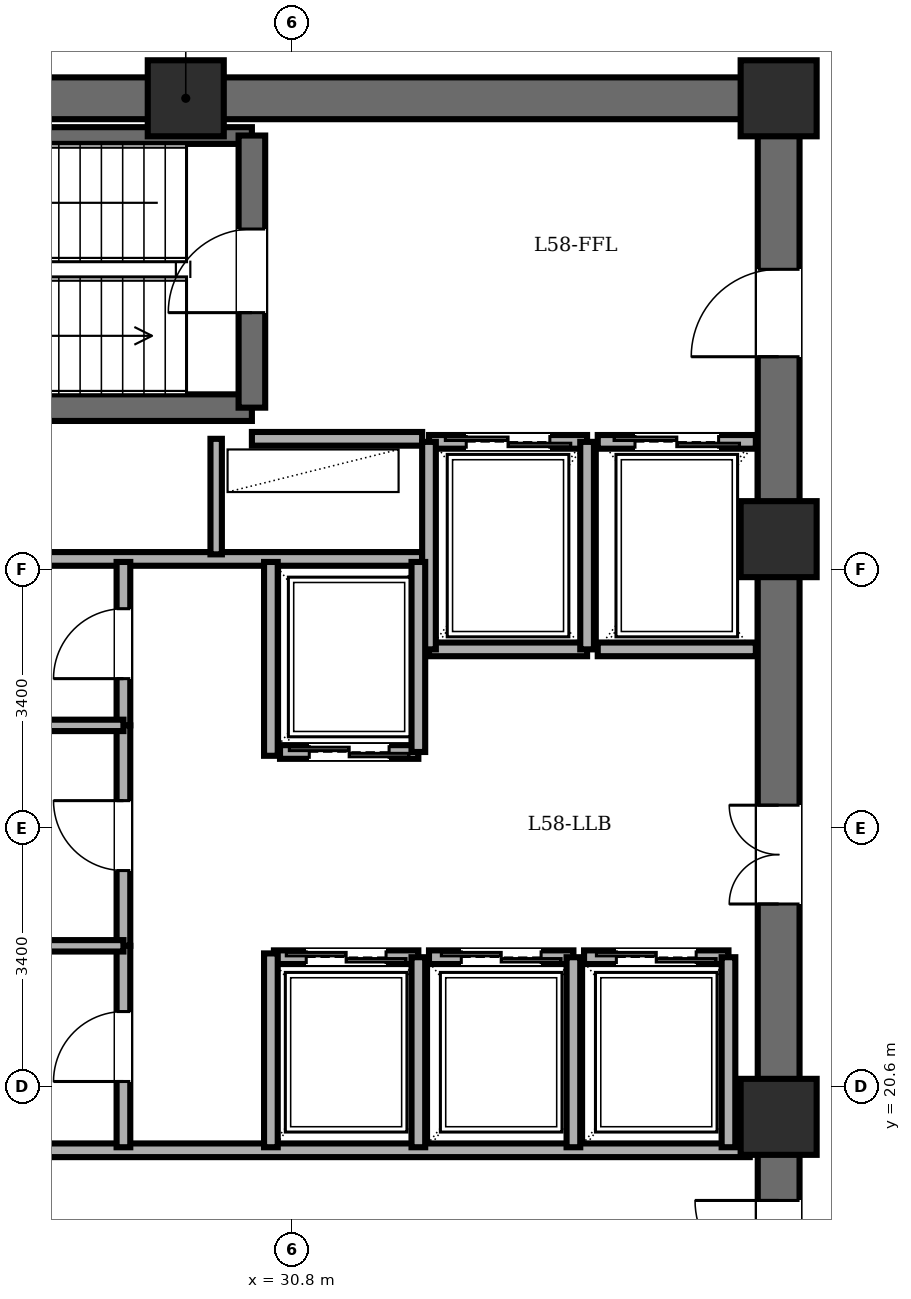
"""IFC4 building model, lengths in metres.
Left out: names, types, materials, properties, quantities, classifications, styles, units other than length and angle.
Written with IfcOpenShell. Run it as: python <this file> out.ifc"""

import sys

from ifc_helpers import new_model, si_unit, direction, frame, frame_2d, origin, origin_2d, place, context, subcontext, project, spatial, rectangle, extrude, element, fill, save


model = new_model("IFC4")
c1 = context("Model", 3, precision=1e-05, world=origin(), true_north=direction((0.0, 1.0)))
c2 = subcontext(c1, "Body", "Model", "MODEL_VIEW")
j1 = project(units=[si_unit("LENGTHUNIT", "METRE"), si_unit("PLANEANGLEUNIT", "RADIAN")], contexts=[c1])
p1 = place(None, origin())
s1 = spatial("IfcSite", under=j1, at=p1, CompositionType="ELEMENT")
p2 = place(p1, origin())
s2 = spatial("IfcBuilding", under=s1, at=p2, CompositionType="ELEMENT")
p3 = place(p2, frame((0.0, 0.0, 222.9)))
s3 = spatial("IfcBuildingStorey", under=s2, at=p3, CompositionType="ELEMENT", Elevation=222.9)
for number, where, z_axis, x_axis in (
    (1, (37.2, 20.2, 0.0), (0.0, 0.0, 1.0), (1.0, 0.0, 0.0)),
    (2, (37.2, 27.8, 0.0), (0.0, 0.0, 1.0), (1.0, 0.0, 0.0)),
    (3, (37.2, 33.6, 0.0), (0.0, 0.0, 1.0), (1.0, 0.0, 0.0)),
    (4, (29.4, 33.6, 0.0), (0.0, 0.0, 1.0), (1.0, 0.0, 0.0)),
):
    element("IfcColumn", number, at=place(p3, frame(where, z_axis=z_axis, x_axis=x_axis)), inside=s3, PredefinedType="COLUMN", context=c2, shape_type="SweptSolid", body=[
        extrude(rectangle(XDim=1.0, YDim=1.0, at=origin_2d()), origin(), (0.0, 0.0, 1.0), 3.6),
    ])
p4 = place(p3, frame((21.6, 33.6, 0.0), z_axis=(0.0, 0.0, 1.0), x_axis=(1.0, 0.0, 0.0)))
e5 = element("IfcWall", 5, at=p4, inside=s3, PredefinedType="SHEAR", context=c2, shape_type="SweptSolid", body=[
    extrude(rectangle(XDim=15.6, YDim=0.55, at=frame_2d((7.8, 0.0))), origin(), (0.0, 0.0, 1.0), 3.4),
])
p5 = place(p3, frame((37.2, 14.4, 0.0), z_axis=(0.0, 0.0, 1.0), x_axis=(0.0, 1.0, 0.0)))
e6 = element("IfcWall", 6, at=p5, inside=s3, PredefinedType="SHEAR", context=c2, shape_type="SweptSolid", body=[
    extrude(rectangle(XDim=19.2, YDim=0.55, at=frame_2d((9.6, 0.0))), origin(), (0.0, 0.0, 1.0), 3.4),
])
p6 = place(p5, frame((15.8, 0.0, 0.0)))
e7 = element("IfcOpeningElement", 7, at=p6, cuts=e6, PredefinedType="OPENING", context=c2, shape_type="SweptSolid", body=[
    extrude(rectangle(XDim=1.15, YDim=2.15, at=frame_2d((0.575, 1.075))), frame((0.0, 0.285, 0.0), z_axis=(0.0, -1.0, 0.0), x_axis=(1.0, 0.0, 0.0)), (0.0, 0.0, 1.0), 0.57),
])
p7 = place(p5, frame((3.6, 0.0, 0.0)))
e8 = element("IfcOpeningElement", 8, at=p7, cuts=e6, PredefinedType="OPENING", context=c2, shape_type="SweptSolid", body=[
    extrude(rectangle(XDim=1.1, YDim=2.15, at=frame_2d((0.55, 1.075))), frame((0.0, 0.285, 0.0), z_axis=(0.0, -1.0, 0.0), x_axis=(1.0, 0.0, 0.0)), (0.0, 0.0, 1.0), 0.57),
])
p8 = place(p5, frame((8.6, 0.0, 0.0)))
e9 = element("IfcOpeningElement", 9, at=p8, cuts=e6, PredefinedType="OPENING", context=c2, shape_type="SweptSolid", body=[
    extrude(rectangle(XDim=1.3, YDim=2.2, at=frame_2d((0.65, 1.1))), frame((0.0, 0.285, 0.0), z_axis=(0.0, -1.0, 0.0), x_axis=(1.0, 0.0, 0.0)), (0.0, 0.0, 1.0), 0.57),
])
p9 = place(p3, frame((22.48, 29.53, 0.0), z_axis=(0.0, 0.0, 1.0), x_axis=(1.0, 0.0, 0.0)))
e10 = element("IfcWall", 10, at=p9, inside=s3, PredefinedType="SOLIDWALL", context=c2, shape_type="SweptSolid", body=[
    extrude(rectangle(XDim=7.79, YDim=0.35, at=frame_2d((3.895, 0.0))), origin(), (0.0, 0.0, 1.0), 3.4),
])
p10 = place(p3, frame((22.48, 33.11, 0.0), z_axis=(0.0, 0.0, 1.0), x_axis=(1.0, 0.0, 0.0)))
e11 = element("IfcWall", 11, at=p10, inside=s3, PredefinedType="PARTITIONING", context=c2, shape_type="SweptSolid", body=[
    extrude(rectangle(XDim=7.79, YDim=0.22, at=frame_2d((3.895, 0.0))), origin(), (0.0, 0.0, 1.0), 3.4),
])
p11 = place(p3, frame((30.27, 29.53, 0.0), z_axis=(0.0, 0.0, 1.0), x_axis=(0.0, 1.0, 0.0)))
e12 = element("IfcWall", 12, at=p11, inside=s3, PredefinedType="SOLIDWALL", context=c2, shape_type="SweptSolid", body=[
    extrude(rectangle(XDim=3.58, YDim=0.35, at=frame_2d((1.79, 0.0))), origin(), (0.0, 0.0, 1.0), 3.4),
])
p12 = place(p11, frame((1.25, 0.0, 0.0)))
e13 = element("IfcOpeningElement", 13, at=p12, cuts=e12, PredefinedType="OPENING", context=c2, shape_type="SweptSolid", body=[
    extrude(rectangle(XDim=1.1, YDim=2.15, at=frame_2d((0.55, 1.075))), frame((0.0, 0.185, 0.0), z_axis=(0.0, -1.0, 0.0), x_axis=(1.0, 0.0, 0.0)), (0.0, 0.0, 1.0), 0.37),
])
p13 = place(p3, frame((30.27, 29.12, 0.0), z_axis=(0.0, 0.0, 1.0), x_axis=(1.0, 0.0, 0.0)))
e14 = element("IfcWall", 14, at=p13, inside=s3, PredefinedType="PARTITIONING", context=c2, shape_type="SweptSolid", body=[
    extrude(rectangle(XDim=2.24, YDim=0.18, at=frame_2d((1.12, 0.0))), origin(), (0.0, 0.0, 1.0), 3.4),
])
p14 = place(p3, frame((21.95, 27.54, 0.0), z_axis=(0.0, 0.0, 1.0), x_axis=(1.0, 0.0, 0.0)))
e15 = element("IfcWall", 15, at=p14, inside=s3, PredefinedType="PARTITIONING", context=c2, shape_type="SweptSolid", body=[
    extrude(rectangle(XDim=10.56, YDim=0.18, at=frame_2d((5.28, 0.0))), origin(), (0.0, 0.0, 1.0), 3.4),
])
p15 = place(p3, frame((29.8, 27.6, 0.0), z_axis=(0.0, 0.0, 1.0), x_axis=(0.0, 1.0, 0.0)))
e16 = element("IfcWall", 16, at=p15, inside=s3, PredefinedType="PARTITIONING", context=c2, shape_type="SweptSolid", body=[
    extrude(rectangle(XDim=1.52, YDim=0.15, at=frame_2d((0.76, 0.0))), origin(), (0.0, 0.0, 1.0), 3.4),
])
p16 = place(p3, frame((21.95, 19.76, 0.0), z_axis=(0.0, 0.0, 1.0), x_axis=(1.0, 0.0, 0.0)))
e17 = element("IfcWall", 17, at=p16, inside=s3, PredefinedType="PARTITIONING", context=c2, shape_type="SweptSolid", body=[
    extrude(rectangle(XDim=14.87, YDim=0.18, at=frame_2d((7.435, 0.0))), origin(), (0.0, 0.0, 1.0), 3.4),
])
p17 = place(p3, frame((32.6, 29.08, 0.0), z_axis=(0.0, 0.0, 1.0), x_axis=(1.0, 0.0, 0.0)))
e18 = element("IfcWall", 18, at=p17, inside=s3, PredefinedType="PARTITIONING", context=c2, shape_type="SweptSolid", body=[
    extrude(rectangle(XDim=2.08, YDim=0.18, at=frame_2d((1.04, 0.0))), origin(), (0.0, 0.0, 1.0), 3.4),
])
p18 = place(p17, frame((0.49, 0.0, 0.0)))
e19 = element("IfcOpeningElement", 19, at=p18, cuts=e18, PredefinedType="OPENING", context=c2, shape_type="SweptSolid", body=[
    extrude(rectangle(XDim=1.1, YDim=2.2, at=frame_2d((0.55, 1.1))), frame((0.0, 0.1, 0.0), z_axis=(0.0, -1.0, 0.0), x_axis=(1.0, 0.0, 0.0)), (0.0, 0.0, 1.0), 0.2),
])
p19 = place(p3, frame((34.68, 26.35, 0.0), z_axis=(0.0, 0.0, 1.0), x_axis=(-1.0, 0.0, 0.0)))
e20 = element("IfcWall", 20, at=p19, inside=s3, PredefinedType="PARTITIONING", context=c2, shape_type="SweptSolid", body=[
    extrude(rectangle(XDim=2.08, YDim=0.18, at=frame_2d((1.04, 0.0))), origin(), (0.0, 0.0, 1.0), 3.4),
])
for number, where, z_axis, x_axis in (
    (21, (34.68, 26.35, 0.0), (0.0, 0.0, 1.0), (0.0, 1.0, 0.0)),
    (22, (32.6, 29.08, 0.0), (0.0, 0.0, 1.0), (0.0, -1.0, 0.0)),
):
    element("IfcWall", number, at=place(p3, frame(where, z_axis=z_axis, x_axis=x_axis)), inside=s3, PredefinedType="PARTITIONING", context=c2, shape_type="SweptSolid", body=[
        extrude(rectangle(XDim=2.73, YDim=0.18, at=frame_2d((1.365, 0.0))), origin(), (0.0, 0.0, 1.0), 3.4),
    ])
p20 = place(p3, frame((34.82, 29.08, 0.0), z_axis=(0.0, 0.0, 1.0), x_axis=(1.0, 0.0, 0.0)))
e23 = element("IfcWall", 23, at=p20, inside=s3, PredefinedType="PARTITIONING", context=c2, shape_type="SweptSolid", body=[
    extrude(rectangle(XDim=2.08, YDim=0.18, at=frame_2d((1.04, 0.0))), origin(), (0.0, 0.0, 1.0), 3.4),
])
p21 = place(p20, frame((0.49, 0.0, 0.0)))
e24 = element("IfcOpeningElement", 24, at=p21, cuts=e23, PredefinedType="OPENING", context=c2, shape_type="SweptSolid", body=[
    extrude(rectangle(XDim=1.1, YDim=2.2, at=frame_2d((0.55, 1.1))), frame((0.0, 0.1, 0.0), z_axis=(0.0, -1.0, 0.0), x_axis=(1.0, 0.0, 0.0)), (0.0, 0.0, 1.0), 0.2),
])
p22 = place(p3, frame((36.9, 26.35, 0.0), z_axis=(0.0, 0.0, 1.0), x_axis=(-1.0, 0.0, 0.0)))
e25 = element("IfcWall", 25, at=p22, inside=s3, PredefinedType="PARTITIONING", context=c2, shape_type="SweptSolid", body=[
    extrude(rectangle(XDim=2.08, YDim=0.18, at=frame_2d((1.04, 0.0))), origin(), (0.0, 0.0, 1.0), 3.4),
])
p23 = place(p3, frame((32.46, 25.0, 0.0), z_axis=(0.0, 0.0, 1.0), x_axis=(-1.0, 0.0, 0.0)))
e26 = element("IfcWall", 26, at=p23, inside=s3, PredefinedType="PARTITIONING", context=c2, shape_type="SweptSolid", body=[
    extrude(rectangle(XDim=1.82, YDim=0.18, at=frame_2d((0.91, 0.0))), origin(), (0.0, 0.0, 1.0), 3.4),
])
p24 = place(p23, frame((0.385, 0.0, 0.0)))
e27 = element("IfcOpeningElement", 27, at=p24, cuts=e26, PredefinedType="OPENING", context=c2, shape_type="SweptSolid", body=[
    extrude(rectangle(XDim=1.05, YDim=2.2, at=frame_2d((0.525, 1.1))), frame((0.0, 0.1, 0.0), z_axis=(0.0, -1.0, 0.0), x_axis=(1.0, 0.0, 0.0)), (0.0, 0.0, 1.0), 0.2),
])
p25 = place(p3, frame((32.46, 25.0, 0.0), z_axis=(0.0, 0.0, 1.0), x_axis=(0.0, 1.0, 0.0)))
e28 = element("IfcWall", 28, at=p25, inside=s3, PredefinedType="PARTITIONING", context=c2, shape_type="SweptSolid", body=[
    extrude(rectangle(XDim=2.5, YDim=0.18, at=frame_2d((1.25, 0.0))), origin(), (0.0, 0.0, 1.0), 3.4),
])
p26 = place(p3, frame((30.56, 22.3, 0.0), z_axis=(0.0, 0.0, 1.0), x_axis=(1.0, 0.0, 0.0)))
e29 = element("IfcWall", 29, at=p26, inside=s3, PredefinedType="PARTITIONING", context=c2, shape_type="SweptSolid", body=[
    extrude(rectangle(XDim=1.9, YDim=0.18, at=frame_2d((0.95, 0.0))), origin(), (0.0, 0.0, 1.0), 3.4),
])
p27 = place(p26, frame((0.425, 0.0, 0.0)))
e30 = element("IfcOpeningElement", 30, at=p27, cuts=e29, PredefinedType="OPENING", context=c2, shape_type="SweptSolid", body=[
    extrude(rectangle(XDim=1.05, YDim=2.2, at=frame_2d((0.525, 1.1))), frame((0.0, 0.1, 0.0), z_axis=(0.0, -1.0, 0.0), x_axis=(1.0, 0.0, 0.0)), (0.0, 0.0, 1.0), 0.2),
])
p28 = place(p3, frame((32.46, 19.8, 0.0), z_axis=(0.0, 0.0, 1.0), x_axis=(0.0, 1.0, 0.0)))
e31 = element("IfcWall", 31, at=p28, inside=s3, PredefinedType="PARTITIONING", context=c2, shape_type="SweptSolid", body=[
    extrude(rectangle(XDim=2.5, YDim=0.18, at=frame_2d((1.25, 0.0))), origin(), (0.0, 0.0, 1.0), 3.4),
])
p29 = place(p3, frame((32.6, 22.3, 0.0), z_axis=(0.0, 0.0, 1.0), x_axis=(1.0, 0.0, 0.0)))
e32 = element("IfcWall", 32, at=p29, inside=s3, PredefinedType="PARTITIONING", context=c2, shape_type="SweptSolid", body=[
    extrude(rectangle(XDim=1.9, YDim=0.18, at=frame_2d((0.95, 0.0))), origin(), (0.0, 0.0, 1.0), 3.4),
])
p30 = place(p29, frame((0.425, 0.0, 0.0)))
e33 = element("IfcOpeningElement", 33, at=p30, cuts=e32, PredefinedType="OPENING", context=c2, shape_type="SweptSolid", body=[
    extrude(rectangle(XDim=1.05, YDim=2.2, at=frame_2d((0.525, 1.1))), frame((0.0, 0.1, 0.0), z_axis=(0.0, -1.0, 0.0), x_axis=(1.0, 0.0, 0.0)), (0.0, 0.0, 1.0), 0.2),
])
p31 = place(p3, frame((34.5, 19.8, 0.0), z_axis=(0.0, 0.0, 1.0), x_axis=(0.0, 1.0, 0.0)))
e34 = element("IfcWall", 34, at=p31, inside=s3, PredefinedType="PARTITIONING", context=c2, shape_type="SweptSolid", body=[
    extrude(rectangle(XDim=2.5, YDim=0.18, at=frame_2d((1.25, 0.0))), origin(), (0.0, 0.0, 1.0), 3.4),
])
p32 = place(p3, frame((34.64, 22.3, 0.0), z_axis=(0.0, 0.0, 1.0), x_axis=(1.0, 0.0, 0.0)))
e35 = element("IfcWall", 35, at=p32, inside=s3, PredefinedType="PARTITIONING", context=c2, shape_type="SweptSolid", body=[
    extrude(rectangle(XDim=1.9, YDim=0.18, at=frame_2d((0.95, 0.0))), origin(), (0.0, 0.0, 1.0), 3.4),
])
p33 = place(p32, frame((0.425, 0.0, 0.0)))
e36 = element("IfcOpeningElement", 36, at=p33, cuts=e35, PredefinedType="OPENING", context=c2, shape_type="SweptSolid", body=[
    extrude(rectangle(XDim=1.05, YDim=2.2, at=frame_2d((0.525, 1.1))), frame((0.0, 0.1, 0.0), z_axis=(0.0, -1.0, 0.0), x_axis=(1.0, 0.0, 0.0)), (0.0, 0.0, 1.0), 0.2),
])
p34 = place(p3, frame((36.54, 19.8, 0.0), z_axis=(0.0, 0.0, 1.0), x_axis=(0.0, 1.0, 0.0)))
e37 = element("IfcWall", 37, at=p34, inside=s3, PredefinedType="PARTITIONING", context=c2, shape_type="SweptSolid", body=[
    extrude(rectangle(XDim=2.5, YDim=0.18, at=frame_2d((1.25, 0.0))), origin(), (0.0, 0.0, 1.0), 3.4),
])
for number, where, z_axis, x_axis in (
    (38, (30.52, 24.95, 0.0), (0.0, 0.0, 1.0), (0.0, 1.0, 0.0)),
    (39, (30.52, 19.8, 0.0), (0.0, 0.0, 1.0), (0.0, 1.0, 0.0)),
):
    element("IfcWall", number, at=place(p3, frame(where, z_axis=z_axis, x_axis=x_axis)), inside=s3, PredefinedType="PARTITIONING", context=c2, shape_type="SweptSolid", body=[
        extrude(rectangle(XDim=2.55, YDim=0.18, at=frame_2d((1.275, 0.0))), origin(), (0.0, 0.0, 1.0), 3.4),
    ])
p35 = place(p3, frame((28.58, 25.35, 0.0), z_axis=(0.0, 0.0, 1.0), x_axis=(0.0, 1.0, 0.0)))
e40 = element("IfcWall", 40, at=p35, inside=s3, PredefinedType="PARTITIONING", context=c2, shape_type="SweptSolid", body=[
    extrude(rectangle(XDim=2.15, YDim=0.18, at=frame_2d((1.075, 0.0))), origin(), (0.0, 0.0, 1.0), 3.4),
])
p36 = place(p35, frame((0.615, 0.0, 0.0)))
e41 = element("IfcOpeningElement", 41, at=p36, cuts=e40, PredefinedType="OPENING", context=c2, shape_type="SweptSolid", body=[
    extrude(rectangle(XDim=0.92, YDim=2.1, at=frame_2d((0.46, 1.05))), frame((0.0, 0.1, 0.0), z_axis=(0.0, -1.0, 0.0), x_axis=(1.0, 0.0, 0.0)), (0.0, 0.0, 1.0), 0.2),
])
p37 = place(p3, frame((28.58, 22.45, 0.0), z_axis=(0.0, 0.0, 1.0), x_axis=(0.0, 1.0, 0.0)))
e42 = element("IfcWall", 42, at=p37, inside=s3, PredefinedType="PARTITIONING", context=c2, shape_type="SweptSolid", body=[
    extrude(rectangle(XDim=2.9, YDim=0.18, at=frame_2d((1.45, 0.0))), origin(), (0.0, 0.0, 1.0), 3.4),
])
p38 = place(p37, frame((0.99, 0.0, 0.0)))
e43 = element("IfcOpeningElement", 43, at=p38, cuts=e42, PredefinedType="OPENING", context=c2, shape_type="SweptSolid", body=[
    extrude(rectangle(XDim=0.92, YDim=2.1, at=frame_2d((0.46, 1.05))), frame((0.0, 0.1, 0.0), z_axis=(0.0, -1.0, 0.0), x_axis=(1.0, 0.0, 0.0)), (0.0, 0.0, 1.0), 0.2),
])
p39 = place(p3, frame((28.58, 19.8, 0.0), z_axis=(0.0, 0.0, 1.0), x_axis=(0.0, 1.0, 0.0)))
e44 = element("IfcWall", 44, at=p39, inside=s3, PredefinedType="PARTITIONING", context=c2, shape_type="SweptSolid", body=[
    extrude(rectangle(XDim=2.65, YDim=0.18, at=frame_2d((1.325, 0.0))), origin(), (0.0, 0.0, 1.0), 3.4),
])
p40 = place(p39, frame((0.865, 0.0, 0.0)))
e45 = element("IfcOpeningElement", 45, at=p40, cuts=e44, PredefinedType="OPENING", context=c2, shape_type="SweptSolid", body=[
    extrude(rectangle(XDim=0.92, YDim=2.1, at=frame_2d((0.46, 1.05))), frame((0.0, 0.1, 0.0), z_axis=(0.0, -1.0, 0.0), x_axis=(1.0, 0.0, 0.0)), (0.0, 0.0, 1.0), 0.2),
])
for number, where, z_axis, x_axis in (
    (46, (21.95, 25.35, 0.0), (0.0, 0.0, 1.0), (1.0, 0.0, 0.0)),
    (47, (21.95, 22.45, 0.0), (0.0, 0.0, 1.0), (1.0, 0.0, 0.0)),
):
    element("IfcWall", number, at=place(p3, frame(where, z_axis=z_axis, x_axis=x_axis)), inside=s3, PredefinedType="PARTITIONING", context=c2, shape_type="SweptSolid", body=[
        extrude(rectangle(XDim=6.63, YDim=0.15, at=frame_2d((3.315, 0.0))), origin(), (0.0, 0.0, 1.0), 3.4),
    ])
p41 = place(p12, origin())
e48 = element("IfcDoor", 48, at=p41, inside=s3, OperationType="SINGLE_SWING_LEFT", PredefinedType="DOOR", context=c2, shape_type="SweptSolid", body=[
    extrude(rectangle(XDim=1.1, YDim=2.15, at=frame_2d((0.55, 1.075))), frame((0.0, 0.025, 0.0), z_axis=(0.0, -1.0, 0.0), x_axis=(1.0, 0.0, 0.0)), (0.0, 0.0, 1.0), 0.05),
])
fill(e13, e48)
p42 = place(p6, origin())
e49 = element("IfcDoor", 49, at=p42, inside=s3, OperationType="SINGLE_SWING_LEFT", PredefinedType="DOOR", context=c2, shape_type="SweptSolid", body=[
    extrude(rectangle(XDim=1.15, YDim=2.15, at=frame_2d((0.575, 1.075))), frame((0.0, 0.025, 0.0), z_axis=(0.0, -1.0, 0.0), x_axis=(1.0, 0.0, 0.0)), (0.0, 0.0, 1.0), 0.05),
])
fill(e7, e49)
p43 = place(p7, origin())
e50 = element("IfcDoor", 50, at=p43, inside=s3, OperationType="SINGLE_SWING_RIGHT", PredefinedType="DOOR", context=c2, shape_type="SweptSolid", body=[
    extrude(rectangle(XDim=1.1, YDim=2.15, at=frame_2d((0.55, 1.075))), frame((0.0, 0.025, 0.0), z_axis=(0.0, -1.0, 0.0), x_axis=(1.0, 0.0, 0.0)), (0.0, 0.0, 1.0), 0.05),
])
fill(e8, e50)
p44 = place(p18, origin())
e51 = element("IfcDoor", 51, at=p44, inside=s3, OperationType="DOUBLE_DOOR_SLIDING", PredefinedType="DOOR", context=c2, shape_type="SweptSolid", body=[
    extrude(rectangle(XDim=1.1, YDim=2.2, at=frame_2d((0.55, 1.1))), frame((0.0, 0.025, 0.0), z_axis=(0.0, -1.0, 0.0), x_axis=(1.0, 0.0, 0.0)), (0.0, 0.0, 1.0), 0.05),
])
fill(e19, e51)
p45 = place(p21, origin())
e52 = element("IfcDoor", 52, at=p45, inside=s3, OperationType="DOUBLE_DOOR_SLIDING", PredefinedType="DOOR", context=c2, shape_type="SweptSolid", body=[
    extrude(rectangle(XDim=1.1, YDim=2.2, at=frame_2d((0.55, 1.1))), frame((0.0, 0.025, 0.0), z_axis=(0.0, -1.0, 0.0), x_axis=(1.0, 0.0, 0.0)), (0.0, 0.0, 1.0), 0.05),
])
fill(e24, e52)
p46 = place(p24, origin())
e53 = element("IfcDoor", 53, at=p46, inside=s3, OperationType="DOUBLE_DOOR_SLIDING", PredefinedType="DOOR", context=c2, shape_type="SweptSolid", body=[
    extrude(rectangle(XDim=1.05, YDim=2.2, at=frame_2d((0.525, 1.1))), frame((0.0, 0.025, 0.0), z_axis=(0.0, -1.0, 0.0), x_axis=(1.0, 0.0, 0.0)), (0.0, 0.0, 1.0), 0.05),
])
fill(e27, e53)
p47 = place(p27, origin())
e54 = element("IfcDoor", 54, at=p47, inside=s3, OperationType="DOUBLE_DOOR_SLIDING", PredefinedType="DOOR", context=c2, shape_type="SweptSolid", body=[
    extrude(rectangle(XDim=1.05, YDim=2.2, at=frame_2d((0.525, 1.1))), frame((0.0, 0.025, 0.0), z_axis=(0.0, -1.0, 0.0), x_axis=(1.0, 0.0, 0.0)), (0.0, 0.0, 1.0), 0.05),
])
fill(e30, e54)
p48 = place(p30, origin())
e55 = element("IfcDoor", 55, at=p48, inside=s3, OperationType="DOUBLE_DOOR_SLIDING", PredefinedType="DOOR", context=c2, shape_type="SweptSolid", body=[
    extrude(rectangle(XDim=1.05, YDim=2.2, at=frame_2d((0.525, 1.1))), frame((0.0, 0.025, 0.0), z_axis=(0.0, -1.0, 0.0), x_axis=(1.0, 0.0, 0.0)), (0.0, 0.0, 1.0), 0.05),
])
fill(e33, e55)
p49 = place(p33, origin())
e56 = element("IfcDoor", 56, at=p49, inside=s3, OperationType="DOUBLE_DOOR_SLIDING", PredefinedType="DOOR", context=c2, shape_type="SweptSolid", body=[
    extrude(rectangle(XDim=1.05, YDim=2.2, at=frame_2d((0.525, 1.1))), frame((0.0, 0.025, 0.0), z_axis=(0.0, -1.0, 0.0), x_axis=(1.0, 0.0, 0.0)), (0.0, 0.0, 1.0), 0.05),
])
fill(e36, e56)
p50 = place(p36, origin())
e57 = element("IfcDoor", 57, at=p50, inside=s3, OperationType="SINGLE_SWING_LEFT", PredefinedType="DOOR", context=c2, shape_type="SweptSolid", body=[
    extrude(rectangle(XDim=0.92, YDim=2.1, at=frame_2d((0.46, 1.05))), frame((0.0, 0.025, 0.0), z_axis=(0.0, -1.0, 0.0), x_axis=(1.0, 0.0, 0.0)), (0.0, 0.0, 1.0), 0.05),
])
fill(e41, e57)
p51 = place(p38, origin())
e58 = element("IfcDoor", 58, at=p51, inside=s3, OperationType="SINGLE_SWING_RIGHT", PredefinedType="DOOR", context=c2, shape_type="SweptSolid", body=[
    extrude(rectangle(XDim=0.92, YDim=2.1, at=frame_2d((0.46, 1.05))), frame((0.0, 0.025, 0.0), z_axis=(0.0, -1.0, 0.0), x_axis=(1.0, 0.0, 0.0)), (0.0, 0.0, 1.0), 0.05),
])
fill(e43, e58)
p52 = place(p40, origin())
e59 = element("IfcDoor", 59, at=p52, inside=s3, OperationType="SINGLE_SWING_LEFT", PredefinedType="DOOR", context=c2, shape_type="SweptSolid", body=[
    extrude(rectangle(XDim=0.92, YDim=2.1, at=frame_2d((0.46, 1.05))), frame((0.0, 0.025, 0.0), z_axis=(0.0, -1.0, 0.0), x_axis=(1.0, 0.0, 0.0)), (0.0, 0.0, 1.0), 0.05),
])
fill(e45, e59)
p53 = place(p8, origin())
e60 = element("IfcDoor", 60, at=p53, inside=s3, OperationType="DOUBLE_DOOR_SINGLE_SWING", PredefinedType="DOOR", context=c2, shape_type="SweptSolid", body=[
    extrude(rectangle(XDim=1.3, YDim=2.2, at=frame_2d((0.65, 1.1))), frame((0.0, 0.025, 0.0), z_axis=(0.0, -1.0, 0.0), x_axis=(1.0, 0.0, 0.0)), (0.0, 0.0, 1.0), 0.05),
])
fill(e9, e60)
save(model, sys.argv[1])
